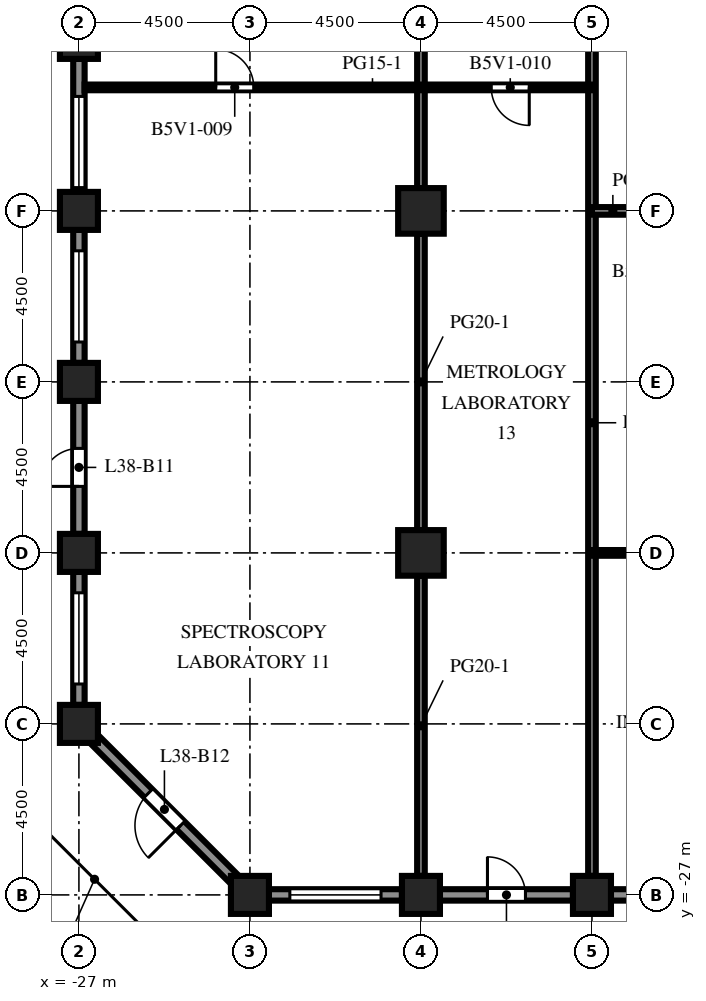
"""IFC4 building model, lengths in metres.
Left out: names, types, materials, properties, quantities, classifications, styles, units other than length and angle.
Written with IfcOpenShell. Run it as: python <this file> out.ifc"""

import sys

from ifc_helpers import new_model, si_unit, direction, frame, frame_2d, origin, origin_2d, place, context, subcontext, project, spatial, rectangle, extrude, element, fill, save


model = new_model("IFC4")
c1 = context("Model", 3, precision=1e-05, world=origin(), true_north=direction((0.0, 1.0)))
c2 = subcontext(c1, "Body", "Model", "MODEL_VIEW")
j1 = project(units=[si_unit("LENGTHUNIT", "METRE"), si_unit("PLANEANGLEUNIT", "RADIAN")], contexts=[c1])
p1 = place(None, origin())
s1 = spatial("IfcSite", under=j1, at=p1, CompositionType="ELEMENT")
p2 = place(p1, origin())
s2 = spatial("IfcBuilding", under=s1, at=p2, CompositionType="ELEMENT")
p3 = place(p2, frame((0.0, 0.0, 169.1)))
s3 = spatial("IfcBuildingStorey", under=s2, at=p3, CompositionType="ELEMENT", Elevation=169.1)
for number, where, z_axis, x_axis in (
    (1, (-27.0, -22.5, 0.0), (0.0, 0.0, 1.0), (1.0, 0.0, 0.0)),
    (2, (-27.0, -18.0, 0.0), (0.0, 0.0, 1.0), (1.0, 0.0, 0.0)),
    (3, (-27.0, -13.5, 0.0), (0.0, 0.0, 1.0), (1.0, 0.0, 0.0)),
    (4, (-27.0, -9.0, 0.0), (0.0, 0.0, 1.0), (1.0, 0.0, 0.0)),
    (5, (-27.0, -4.5, 0.0), (0.0, 0.0, 1.0), (1.0, 0.0, 0.0)),
    (6, (-22.5, -27.0, 0.0), (0.0, 0.0, 1.0), (1.0, 0.0, 0.0)),
    (7, (-18.0, -27.0, 0.0), (0.0, 0.0, 1.0), (1.0, 0.0, 0.0)),
    (8, (-13.5, -27.0, 0.0), (0.0, 0.0, 1.0), (1.0, 0.0, 0.0)),
):
    element("IfcColumn", number, at=place(p3, frame(where, z_axis=z_axis, x_axis=x_axis)), inside=s3, PredefinedType="COLUMN", context=c2, shape_type="SweptSolid", body=[
        extrude(rectangle(XDim=1.0, YDim=1.0, at=origin_2d()), origin(), (0.0, 0.0, 1.0), 4.1),
    ])
for number, where, z_axis, x_axis in (
    (9, (-18.0, -18.0, 0.0), (0.0, 0.0, 1.0), (1.0, 0.0, 0.0)),
    (10, (-18.0, -9.0, 0.0), (0.0, 0.0, 1.0), (1.0, 0.0, 0.0)),
):
    element("IfcColumn", number, at=place(p3, frame(where, z_axis=z_axis, x_axis=x_axis)), inside=s3, PredefinedType="COLUMN", context=c2, shape_type="SweptSolid", body=[
        extrude(rectangle(XDim=1.2, YDim=1.2, at=origin_2d()), origin(), (0.0, 0.0, 1.0), 4.1),
    ])
p4 = place(p3, frame((-18.5, -27.0, 0.0), z_axis=(0.0, 0.0, 1.0), x_axis=(-1.0, 0.0, 0.0)))
e11 = element("IfcWall", 11, at=p4, inside=s3, PredefinedType="SOLIDWALL", context=c2, shape_type="SweptSolid", body=[
    extrude(rectangle(XDim=3.5, YDim=0.3, at=frame_2d((1.75, 0.0))), origin(), (0.0, 0.0, 1.0), 2.85),
])
p5 = place(p4, frame((0.55, 0.0, 0.8)))
e12 = element("IfcOpeningElement", 12, at=p5, cuts=e11, PredefinedType="OPENING", context=c2, shape_type="SweptSolid", body=[
    extrude(rectangle(XDim=2.4, YDim=1.7, at=frame_2d((1.2, 0.85))), frame((0.0, 0.16, 0.0), z_axis=(0.0, -1.0, 0.0), x_axis=(1.0, 0.0, 0.0)), (0.0, 0.0, 1.0), 0.32),
])
p6 = place(p3, frame((-14.0, -27.0, 0.0), z_axis=(0.0, 0.0, 1.0), x_axis=(-1.0, 0.0, 0.0)))
e13 = element("IfcWall", 13, at=p6, inside=s3, PredefinedType="SOLIDWALL", context=c2, shape_type="SweptSolid", body=[
    extrude(rectangle(XDim=3.5, YDim=0.3, at=frame_2d((1.75, 0.0))), origin(), (0.0, 0.0, 1.0), 2.85),
])
p7 = place(p6, frame((1.25, 0.0, 0.0)))
e14 = element("IfcOpeningElement", 14, at=p7, cuts=e13, PredefinedType="OPENING", context=c2, shape_type="SweptSolid", body=[
    extrude(rectangle(XDim=1.0, YDim=2.2, at=frame_2d((0.5, 1.1))), frame((0.0, 0.16, 0.0), z_axis=(0.0, -1.0, 0.0), x_axis=(1.0, 0.0, 0.0)), (0.0, 0.0, 1.0), 0.32),
])
p8 = place(p3, frame((-9.5, -27.0, 0.0), z_axis=(0.0, 0.0, 1.0), x_axis=(-1.0, 0.0, 0.0)))
e15 = element("IfcWall", 15, at=p8, inside=s3, PredefinedType="SOLIDWALL", context=c2, shape_type="SweptSolid", body=[
    extrude(rectangle(XDim=3.5, YDim=0.3, at=frame_2d((1.75, 0.0))), origin(), (0.0, 0.0, 1.0), 2.85),
])
p9 = place(p8, frame((0.55, 0.0, 0.8)))
e16 = element("IfcOpeningElement", 16, at=p9, cuts=e15, PredefinedType="OPENING", context=c2, shape_type="SweptSolid", body=[
    extrude(rectangle(XDim=2.4, YDim=1.7, at=frame_2d((1.2, 0.85))), frame((0.0, 0.16, 0.0), z_axis=(0.0, -1.0, 0.0), x_axis=(1.0, 0.0, 0.0)), (0.0, 0.0, 1.0), 0.32),
])
p10 = place(p3, frame((-27.0, -8.5, 0.0), z_axis=(0.0, 0.0, 1.0), x_axis=(0.0, 1.0, 0.0)))
e17 = element("IfcWall", 17, at=p10, inside=s3, PredefinedType="SOLIDWALL", context=c2, shape_type="SweptSolid", body=[
    extrude(rectangle(XDim=3.5, YDim=0.3, at=frame_2d((1.75, 0.0))), origin(), (0.0, 0.0, 1.0), 2.85),
])
p11 = place(p10, frame((0.113, 0.0, 0.8)))
e18 = element("IfcOpeningElement", 18, at=p11, cuts=e17, PredefinedType="OPENING", context=c2, shape_type="SweptSolid", body=[
    extrude(rectangle(XDim=2.4, YDim=1.7, at=frame_2d((1.2, 0.85))), frame((0.0, 0.16, 0.0), z_axis=(0.0, -1.0, 0.0), x_axis=(1.0, 0.0, 0.0)), (0.0, 0.0, 1.0), 0.32),
])
p12 = place(p3, frame((-27.0, -13.0, 0.0), z_axis=(0.0, 0.0, 1.0), x_axis=(0.0, 1.0, 0.0)))
e19 = element("IfcWall", 19, at=p12, inside=s3, PredefinedType="SOLIDWALL", context=c2, shape_type="SweptSolid", body=[
    extrude(rectangle(XDim=3.5, YDim=0.3, at=frame_2d((1.75, 0.0))), origin(), (0.0, 0.0, 1.0), 2.85),
])
p13 = place(p12, frame((0.55, 0.0, 0.8)))
e20 = element("IfcOpeningElement", 20, at=p13, cuts=e19, PredefinedType="OPENING", context=c2, shape_type="SweptSolid", body=[
    extrude(rectangle(XDim=2.4, YDim=1.7, at=frame_2d((1.2, 0.85))), frame((0.0, 0.16, 0.0), z_axis=(0.0, -1.0, 0.0), x_axis=(1.0, 0.0, 0.0)), (0.0, 0.0, 1.0), 0.32),
])
p14 = place(p3, frame((-27.0, -17.5, 0.0), z_axis=(0.0, 0.0, 1.0), x_axis=(0.0, 1.0, 0.0)))
e21 = element("IfcWall", 21, at=p14, inside=s3, PredefinedType="SOLIDWALL", context=c2, shape_type="SweptSolid", body=[
    extrude(rectangle(XDim=3.5, YDim=0.3, at=frame_2d((1.75, 0.0))), origin(), (0.0, 0.0, 1.0), 2.85),
])
p15 = place(p14, frame((1.25, 0.0, 0.0)))
e22 = element("IfcOpeningElement", 22, at=p15, cuts=e21, PredefinedType="OPENING", context=c2, shape_type="SweptSolid", body=[
    extrude(rectangle(XDim=1.0, YDim=2.2, at=frame_2d((0.5, 1.1))), frame((0.0, 0.16, 0.0), z_axis=(0.0, -1.0, 0.0), x_axis=(1.0, 0.0, 0.0)), (0.0, 0.0, 1.0), 0.32),
])
p16 = place(p3, frame((-27.0, -22.0, 0.0), z_axis=(0.0, 0.0, 1.0), x_axis=(0.0, 1.0, 0.0)))
e23 = element("IfcWall", 23, at=p16, inside=s3, PredefinedType="SOLIDWALL", context=c2, shape_type="SweptSolid", body=[
    extrude(rectangle(XDim=3.5, YDim=0.3, at=frame_2d((1.75, 0.0))), origin(), (0.0, 0.0, 1.0), 2.85),
])
p17 = place(p16, frame((0.55, 0.0, 0.8)))
e24 = element("IfcOpeningElement", 24, at=p17, cuts=e23, PredefinedType="OPENING", context=c2, shape_type="SweptSolid", body=[
    extrude(rectangle(XDim=2.4, YDim=1.7, at=frame_2d((1.2, 0.85))), frame((0.0, 0.16, 0.0), z_axis=(0.0, -1.0, 0.0), x_axis=(1.0, 0.0, 0.0)), (0.0, 0.0, 1.0), 0.32),
])
p18 = place(p3, frame((-22.894, -26.606, 0.0), z_axis=(0.0, 0.0, 1.0), x_axis=(-0.707106781187, 0.707106781187, 0.0)))
e25 = element("IfcWall", 25, at=p18, inside=s3, PredefinedType="SOLIDWALL", context=c2, shape_type="SweptSolid", body=[
    extrude(rectangle(XDim=5.25, YDim=0.3, at=frame_2d((2.625, 0.0))), origin(), (0.0, 0.0, 1.0), 2.85),
])
p19 = place(p18, frame((2.025, 0.0, 0.0)))
e26 = element("IfcOpeningElement", 26, at=p19, cuts=e25, PredefinedType="OPENING", context=c2, shape_type="SweptSolid", body=[
    extrude(rectangle(XDim=1.2, YDim=2.2, at=frame_2d((0.6, 1.1))), frame((0.0, 0.16, 0.0), z_axis=(0.0, -1.0, 0.0), x_axis=(1.0, 0.0, 0.0)), (0.0, 0.0, 1.0), 0.32),
])
p20 = place(p3, frame((-18.0, -26.5, 0.0), z_axis=(0.0, 0.0, 1.0), x_axis=(0.0, 1.0, 0.0)))
e27 = element("IfcWall", 27, at=p20, inside=s3, PredefinedType="PARTITIONING", context=c2, shape_type="SweptSolid", body=[
    extrude(rectangle(XDim=7.9, YDim=0.2, at=frame_2d((3.95, 0.0))), origin(), (0.0, 0.0, 1.0), 3.65),
])
for number, where, z_axis, x_axis in (
    (28, (-18.0, -17.4, 0.0), (0.0, 0.0, 1.0), (0.0, 1.0, 0.0)),
    (29, (-18.0, -8.4, 0.0), (0.0, 0.0, 1.0), (0.0, 1.0, 0.0)),
):
    element("IfcWall", number, at=place(p3, frame(where, z_axis=z_axis, x_axis=x_axis)), inside=s3, PredefinedType="PARTITIONING", context=c2, shape_type="SweptSolid", body=[
        extrude(rectangle(XDim=7.8, YDim=0.2, at=frame_2d((3.9, 0.0))), origin(), (0.0, 0.0, 1.0), 3.65),
    ])
p21 = place(p3, frame((-13.5, -26.5, 0.0), z_axis=(0.0, 0.0, 1.0), x_axis=(0.0, 1.0, 0.0)))
e30 = element("IfcWall", 30, at=p21, inside=s3, PredefinedType="PARTITIONING", context=c2, shape_type="SweptSolid", body=[
    extrude(rectangle(XDim=29.75, YDim=0.2, at=frame_2d((14.875, 0.0))), origin(), (0.0, 0.0, 1.0), 3.65),
])
p22 = place(p21, frame((23.85, 0.0, 0.0)))
e31 = element("IfcOpeningElement", 31, at=p22, cuts=e30, PredefinedType="OPENING", context=c2, shape_type="SweptSolid", body=[
    extrude(rectangle(XDim=1.0, YDim=2.1, at=frame_2d((0.5, 1.05))), frame((0.0, 0.11, 0.0), z_axis=(0.0, -1.0, 0.0), x_axis=(1.0, 0.0, 0.0)), (0.0, 0.0, 1.0), 0.22),
])
p23 = place(p3, frame((-13.5, -18.0, 0.0), z_axis=(0.0, 0.0, 1.0), x_axis=(1.0, 0.0, 0.0)))
e32 = element("IfcWall", 32, at=p23, inside=s3, PredefinedType="PARTITIONING", context=c2, shape_type="SweptSolid", body=[
    extrude(rectangle(XDim=3.9, YDim=0.15, at=frame_2d((1.95, 0.0))), origin(), (0.0, 0.0, 1.0), 3.65),
])
p24 = place(p3, frame((-10.5, -9.0, 0.0), z_axis=(0.0, 0.0, 1.0), x_axis=(-1.0, 0.0, 0.0)))
e33 = element("IfcWall", 33, at=p24, inside=s3, PredefinedType="PARTITIONING", context=c2, shape_type="SweptSolid", body=[
    extrude(rectangle(XDim=3.0, YDim=0.2, at=frame_2d((1.5, 0.0))), origin(), (0.0, 0.0, 1.0), 3.65),
])
p25 = place(p24, frame((0.9, 0.0, 0.0)))
e34 = element("IfcOpeningElement", 34, at=p25, cuts=e33, PredefinedType="OPENING", context=c2, shape_type="SweptSolid", body=[
    extrude(rectangle(XDim=1.0, YDim=2.1, at=frame_2d((0.5, 1.05))), frame((0.0, 0.11, 0.0), z_axis=(0.0, -1.0, 0.0), x_axis=(1.0, 0.0, 0.0)), (0.0, 0.0, 1.0), 0.22),
])
p26 = place(p3, frame((-13.5, -5.75, 0.0), z_axis=(0.0, 0.0, 1.0), x_axis=(-1.0, 0.0, 0.0)))
e35 = element("IfcWall", 35, at=p26, inside=s3, PredefinedType="PARTITIONING", context=c2, shape_type="SweptSolid", body=[
    extrude(rectangle(XDim=13.35, YDim=0.15, at=frame_2d((6.675, 0.0))), origin(), (0.0, 0.0, 1.0), 3.65),
])
p27 = place(p26, frame((8.9, 0.0, 0.0)))
e36 = element("IfcOpeningElement", 36, at=p27, cuts=e35, PredefinedType="OPENING", context=c2, shape_type="SweptSolid", body=[
    extrude(rectangle(XDim=1.0, YDim=2.1, at=frame_2d((0.5, 1.05))), frame((0.0, 0.085, 0.0), z_axis=(0.0, -1.0, 0.0), x_axis=(1.0, 0.0, 0.0)), (0.0, 0.0, 1.0), 0.17),
])
p28 = place(p26, frame((1.65, 0.0, 0.0)))
e37 = element("IfcOpeningElement", 37, at=p28, cuts=e35, PredefinedType="OPENING", context=c2, shape_type="SweptSolid", body=[
    extrude(rectangle(XDim=1.0, YDim=2.1, at=frame_2d((0.5, 1.05))), frame((0.0, 0.085, 0.0), z_axis=(0.0, -1.0, 0.0), x_axis=(1.0, 0.0, 0.0)), (0.0, 0.0, 1.0), 0.17),
])
p29 = place(p5, origin())
e38 = element("IfcWindow", 38, at=p29, inside=s3, PartitioningType="SINGLE_PANEL", PredefinedType="WINDOW", context=c2, shape_type="SweptSolid", body=[
    extrude(rectangle(XDim=2.4, YDim=1.7, at=frame_2d((1.2, 0.85))), frame((0.0, 0.03, 0.0), z_axis=(0.0, -1.0, 0.0), x_axis=(1.0, 0.0, 0.0)), (0.0, 0.0, 1.0), 0.06),
])
fill(e12, e38)
p30 = place(p7, origin())
e39 = element("IfcDoor", 39, at=p30, inside=s3, OperationType="SINGLE_SWING_RIGHT", PredefinedType="DOOR", context=c2, shape_type="SweptSolid", body=[
    extrude(rectangle(XDim=1.0, YDim=2.2, at=frame_2d((0.5, 1.1))), frame((0.0, 0.025, 0.0), z_axis=(0.0, -1.0, 0.0), x_axis=(1.0, 0.0, 0.0)), (0.0, 0.0, 1.0), 0.05),
])
fill(e14, e39)
p31 = place(p11, origin())
e40 = element("IfcWindow", 40, at=p31, inside=s3, PartitioningType="SINGLE_PANEL", PredefinedType="WINDOW", context=c2, shape_type="SweptSolid", body=[
    extrude(rectangle(XDim=2.4, YDim=1.7, at=frame_2d((1.2, 0.85))), frame((0.0, 0.03, 0.0), z_axis=(0.0, -1.0, 0.0), x_axis=(1.0, 0.0, 0.0)), (0.0, 0.0, 1.0), 0.06),
])
fill(e18, e40)
p32 = place(p13, origin())
e41 = element("IfcWindow", 41, at=p32, inside=s3, PartitioningType="SINGLE_PANEL", PredefinedType="WINDOW", context=c2, shape_type="SweptSolid", body=[
    extrude(rectangle(XDim=2.4, YDim=1.7, at=frame_2d((1.2, 0.85))), frame((0.0, 0.03, 0.0), z_axis=(0.0, -1.0, 0.0), x_axis=(1.0, 0.0, 0.0)), (0.0, 0.0, 1.0), 0.06),
])
fill(e20, e41)
p33 = place(p15, origin())
e42 = element("IfcDoor", 42, at=p33, inside=s3, OperationType="SINGLE_SWING_LEFT", PredefinedType="DOOR", context=c2, shape_type="SweptSolid", body=[
    extrude(rectangle(XDim=1.0, YDim=2.2, at=frame_2d((0.5, 1.1))), frame((0.0, 0.025, 0.0), z_axis=(0.0, -1.0, 0.0), x_axis=(1.0, 0.0, 0.0)), (0.0, 0.0, 1.0), 0.05),
])
fill(e22, e42)
p34 = place(p17, origin())
e43 = element("IfcWindow", 43, at=p34, inside=s3, PartitioningType="SINGLE_PANEL", PredefinedType="WINDOW", context=c2, shape_type="SweptSolid", body=[
    extrude(rectangle(XDim=2.4, YDim=1.7, at=frame_2d((1.2, 0.85))), frame((0.0, 0.03, 0.0), z_axis=(0.0, -1.0, 0.0), x_axis=(1.0, 0.0, 0.0)), (0.0, 0.0, 1.0), 0.06),
])
fill(e24, e43)
p35 = place(p19, origin())
e44 = element("IfcDoor", 44, at=p35, inside=s3, OperationType="SINGLE_SWING_LEFT", PredefinedType="DOOR", context=c2, shape_type="SweptSolid", body=[
    extrude(rectangle(XDim=1.2, YDim=2.2, at=frame_2d((0.6, 1.1))), frame((0.0, 0.025, 0.0), z_axis=(0.0, -1.0, 0.0), x_axis=(1.0, 0.0, 0.0)), (0.0, 0.0, 1.0), 0.05),
])
fill(e26, e44)
p36 = place(p27, origin())
e45 = element("IfcDoor", 45, at=p36, inside=s3, OperationType="SINGLE_SWING_RIGHT", PredefinedType="DOOR", context=c2, shape_type="SweptSolid", body=[
    extrude(rectangle(XDim=1.0, YDim=2.1, at=frame_2d((0.5, 1.05))), frame((0.0, 0.025, 0.0), z_axis=(0.0, -1.0, 0.0), x_axis=(1.0, 0.0, 0.0)), (0.0, 0.0, 1.0), 0.05),
])
fill(e36, e45)
p37 = place(p28, origin())
e46 = element("IfcDoor", 46, at=p37, inside=s3, OperationType="SINGLE_SWING_LEFT", PredefinedType="DOOR", context=c2, shape_type="SweptSolid", body=[
    extrude(rectangle(XDim=1.0, YDim=2.1, at=frame_2d((0.5, 1.05))), frame((0.0, 0.025, 0.0), z_axis=(0.0, -1.0, 0.0), x_axis=(1.0, 0.0, 0.0)), (0.0, 0.0, 1.0), 0.05),
])
fill(e37, e46)
save(model, sys.argv[1])
